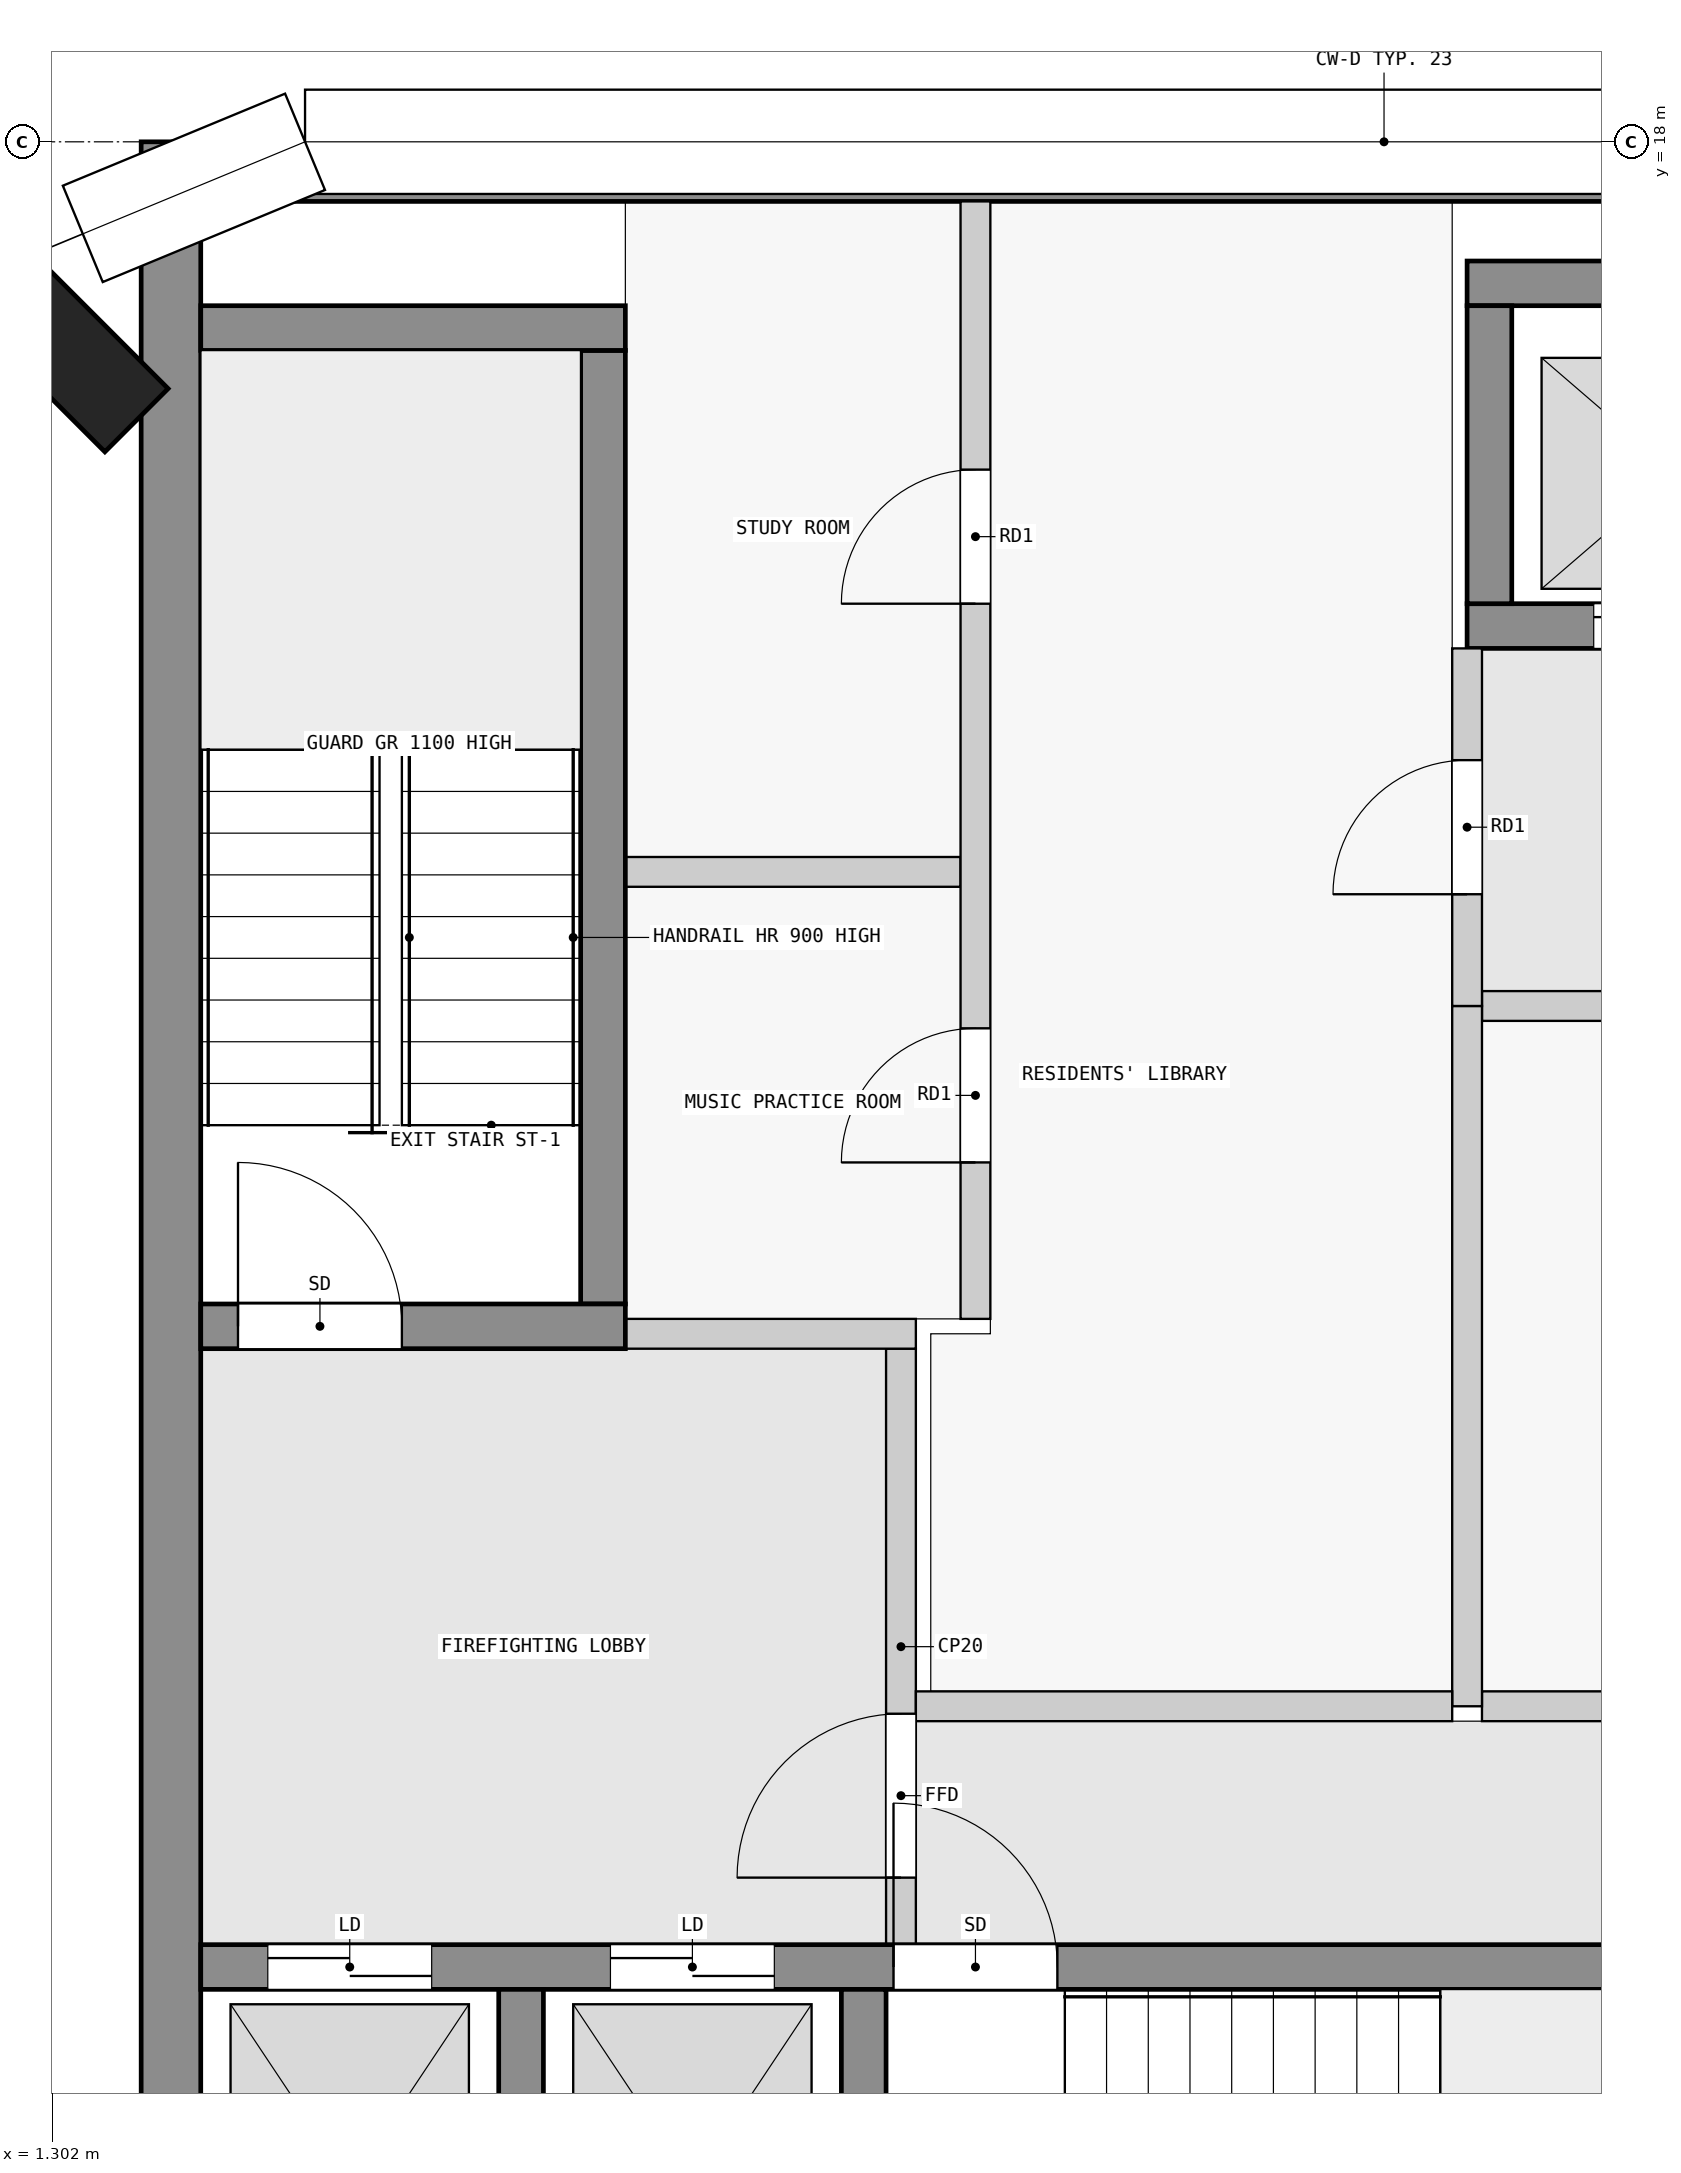
"""IFC4 building model, lengths in metres.
Left out: names, types, materials, properties, quantities, classifications, styles, units other than length and angle.
Written with IfcOpenShell. Run it as: python <this file> out.ifc"""

import sys

from ifc_helpers import new_model, si_unit, direction, frame, frame_2d, origin, origin_2d, place, context, subcontext, project, spatial, rectangle, extrude, element, fill, save


model = new_model("IFC4")
c1 = context("Model", 3, precision=1e-05, world=origin(), true_north=direction((0.0, 1.0)))
c2 = subcontext(c1, "Body", "Model", "MODEL_VIEW")
j1 = project(units=[si_unit("LENGTHUNIT", "METRE"), si_unit("PLANEANGLEUNIT", "RADIAN")], contexts=[c1])
p1 = place(None, origin())
s1 = spatial("IfcSite", under=j1, at=p1, CompositionType="ELEMENT")
p2 = place(p1, origin())
s2 = spatial("IfcBuilding", under=s1, at=p2, CompositionType="ELEMENT")
p3 = place(p2, frame((0.0, 0.0, 298.4)))
s3 = spatial("IfcBuildingStorey", under=s2, at=p3, CompositionType="ELEMENT", Elevation=298.4)
p4 = place(p3, frame((1.374, 16.626, 0.0), z_axis=(0.0, 0.0, 1.0), x_axis=(0.707106781187, 0.707106781187, 0.0)))
e1 = element("IfcColumn", 1, at=p4, inside=s3, PredefinedType="COLUMN", context=c2, shape_type="SweptSolid", body=[
    extrude(rectangle(XDim=0.6, YDim=1.4, at=origin_2d()), origin(), (0.0, 0.0, 1.0), 3.5),
])
p5 = place(p3, frame((1.9, 17.8, 0.0), z_axis=(0.0, 0.0, 1.0), x_axis=(1.0, 0.0, 0.0)))
e2 = element("IfcWall", 2, at=p5, inside=s3, PredefinedType="SHEAR", context=c2, shape_type="SweptSolid", body=[
    extrude(rectangle(XDim=20.6, YDim=0.4, at=frame_2d((10.3, 0.0))), origin(), (0.0, 0.0, 1.0), 3.05),
])
p6 = place(p3, frame((2.1, 2.5, 0.0), z_axis=(0.0, 0.0, 1.0), x_axis=(0.0, 1.0, 0.0)))
e3 = element("IfcWall", 3, at=p6, inside=s3, PredefinedType="SHEAR", context=c2, shape_type="SweptSolid", body=[
    extrude(rectangle(XDim=15.1, YDim=0.4, at=frame_2d((7.55, 0.0))), origin(), (0.0, 0.0, 1.0), 3.05),
])
for number, where, z_axis, x_axis in (
    (4, (4.45, 2.8, 0.0), (0.0, 0.0, 1.0), (0.0, 1.0, 0.0)),
    (5, (6.75, 2.8, 0.0), (0.0, 0.0, 1.0), (0.0, 1.0, 0.0)),
):
    element("IfcWall", number, at=place(p3, frame(where, z_axis=z_axis, x_axis=x_axis)), inside=s3, PredefinedType="SHEAR", context=c2, shape_type="SweptSolid", body=[
        extrude(rectangle(XDim=2.8, YDim=0.3, at=frame_2d((1.4, 0.0))), origin(), (0.0, 0.0, 1.0), 3.05),
    ])
p7 = place(p3, frame((2.3, 5.75, 0.0), z_axis=(0.0, 0.0, 1.0), x_axis=(1.0, 0.0, 0.0)))
e6 = element("IfcWall", 6, at=p7, inside=s3, PredefinedType="SHEAR", context=c2, shape_type="SweptSolid", body=[
    extrude(rectangle(XDim=18.8, YDim=0.3, at=frame_2d((9.4, 0.0))), origin(), (0.0, 0.0, 1.0), 3.05),
])
p8 = place(p7, frame((4.65, 0.0, 0.0)))
e7 = element("IfcOpeningElement", 7, at=p8, cuts=e6, PredefinedType="OPENING", context=c2, shape_type="SweptSolid", body=[
    extrude(rectangle(XDim=1.1, YDim=2.1, at=frame_2d((0.55, 1.05))), frame((0.0, 0.16, 0.0), z_axis=(0.0, -1.0, 0.0), x_axis=(1.0, 0.0, 0.0)), (0.0, 0.0, 1.0), 0.32),
])
p9 = place(p7, frame((0.45, 0.0, 0.0)))
e8 = element("IfcOpeningElement", 8, at=p9, cuts=e6, PredefinedType="OPENING", context=c2, shape_type="SweptSolid", body=[
    extrude(rectangle(XDim=1.1, YDim=2.1, at=frame_2d((0.55, 1.05))), frame((0.0, 0.16, 0.0), z_axis=(0.0, -1.0, 0.0), x_axis=(1.0, 0.0, 0.0)), (0.0, 0.0, 1.0), 0.32),
])
p10 = place(p7, frame((2.75, 0.0, 0.0)))
e9 = element("IfcOpeningElement", 9, at=p10, cuts=e6, PredefinedType="OPENING", context=c2, shape_type="SweptSolid", body=[
    extrude(rectangle(XDim=1.1, YDim=2.1, at=frame_2d((0.55, 1.05))), frame((0.0, 0.16, 0.0), z_axis=(0.0, -1.0, 0.0), x_axis=(1.0, 0.0, 0.0)), (0.0, 0.0, 1.0), 0.32),
])
p11 = place(p7, frame((11.95, 0.0, 0.0)))
e10 = element("IfcOpeningElement", 10, at=p11, cuts=e6, PredefinedType="OPENING", context=c2, shape_type="SweptSolid", body=[
    extrude(rectangle(XDim=0.9, YDim=2.1, at=frame_2d((0.45, 1.05))), frame((0.0, 0.16, 0.0), z_axis=(0.0, -1.0, 0.0), x_axis=(1.0, 0.0, 0.0)), (0.0, 0.0, 1.0), 0.32),
])
p12 = place(p7, frame((15.7, 0.0, 0.0)))
e11 = element("IfcOpeningElement", 11, at=p12, cuts=e6, PredefinedType="OPENING", context=c2, shape_type="SweptSolid", body=[
    extrude(rectangle(XDim=0.9, YDim=2.1, at=frame_2d((0.45, 1.05))), frame((0.0, 0.16, 0.0), z_axis=(0.0, -1.0, 0.0), x_axis=(1.0, 0.0, 0.0)), (0.0, 0.0, 1.0), 0.32),
])
p13 = place(p3, frame((2.3, 10.05, 0.0), z_axis=(0.0, 0.0, 1.0), x_axis=(1.0, 0.0, 0.0)))
e12 = element("IfcWall", 12, at=p13, inside=s3, PredefinedType="SHEAR", context=c2, shape_type="SweptSolid", body=[
    extrude(rectangle(XDim=2.85, YDim=0.3, at=frame_2d((1.425, 0.0))), origin(), (0.0, 0.0, 1.0), 3.05),
])
p14 = place(p13, frame((0.25, 0.0, 0.0)))
e13 = element("IfcOpeningElement", 13, at=p14, cuts=e12, PredefinedType="OPENING", context=c2, shape_type="SweptSolid", body=[
    extrude(rectangle(XDim=1.1, YDim=2.1, at=frame_2d((0.55, 1.05))), frame((0.0, 0.16, 0.0), z_axis=(0.0, -1.0, 0.0), x_axis=(1.0, 0.0, 0.0)), (0.0, 0.0, 1.0), 0.32),
])
p15 = place(p3, frame((5.0, 10.2, 0.0), z_axis=(0.0, 0.0, 1.0), x_axis=(0.0, 1.0, 0.0)))
e14 = element("IfcWall", 14, at=p15, inside=s3, PredefinedType="SHEAR", context=c2, shape_type="SweptSolid", body=[
    extrude(rectangle(XDim=6.4, YDim=0.3, at=frame_2d((3.2, 0.0))), origin(), (0.0, 0.0, 1.0), 3.05),
])
p16 = place(p3, frame((2.3, 16.75, 0.0), z_axis=(0.0, 0.0, 1.0), x_axis=(1.0, 0.0, 0.0)))
e15 = element("IfcWall", 15, at=p16, inside=s3, PredefinedType="SHEAR", context=c2, shape_type="SweptSolid", body=[
    extrude(rectangle(XDim=2.85, YDim=0.3, at=frame_2d((1.425, 0.0))), origin(), (0.0, 0.0, 1.0), 3.05),
])
p17 = place(p3, frame((10.8, 17.05, 0.0), z_axis=(0.0, 0.0, 1.0), x_axis=(1.0, 0.0, 0.0)))
e16 = element("IfcWall", 16, at=p17, inside=s3, PredefinedType="SHEAR", context=c2, shape_type="SweptSolid", body=[
    extrude(rectangle(XDim=7.8, YDim=0.3, at=frame_2d((3.9, 0.0))), origin(), (0.0, 0.0, 1.0), 3.05),
])
p18 = place(p3, frame((10.8, 14.75, 0.0), z_axis=(0.0, 0.0, 1.0), x_axis=(1.0, 0.0, 0.0)))
e17 = element("IfcWall", 17, at=p18, inside=s3, PredefinedType="SHEAR", context=c2, shape_type="SweptSolid", body=[
    extrude(rectangle(XDim=7.8, YDim=0.3, at=frame_2d((3.9, 0.0))), origin(), (0.0, 0.0, 1.0), 3.05),
])
p19 = place(p18, frame((0.85, 0.0, 0.0)))
e18 = element("IfcOpeningElement", 18, at=p19, cuts=e17, PredefinedType="OPENING", context=c2, shape_type="SweptSolid", body=[
    extrude(rectangle(XDim=1.1, YDim=2.1, at=frame_2d((0.55, 1.05))), frame((0.0, 0.16, 0.0), z_axis=(0.0, -1.0, 0.0), x_axis=(1.0, 0.0, 0.0)), (0.0, 0.0, 1.0), 0.32),
])
p20 = place(p18, frame((3.35, 0.0, 0.0)))
e19 = element("IfcOpeningElement", 19, at=p20, cuts=e17, PredefinedType="OPENING", context=c2, shape_type="SweptSolid", body=[
    extrude(rectangle(XDim=1.1, YDim=2.1, at=frame_2d((0.55, 1.05))), frame((0.0, 0.16, 0.0), z_axis=(0.0, -1.0, 0.0), x_axis=(1.0, 0.0, 0.0)), (0.0, 0.0, 1.0), 0.32),
])
p21 = place(p18, frame((5.85, 0.0, 0.0)))
e20 = element("IfcOpeningElement", 20, at=p21, cuts=e17, PredefinedType="OPENING", context=c2, shape_type="SweptSolid", body=[
    extrude(rectangle(XDim=1.1, YDim=2.1, at=frame_2d((0.55, 1.05))), frame((0.0, 0.16, 0.0), z_axis=(0.0, -1.0, 0.0), x_axis=(1.0, 0.0, 0.0)), (0.0, 0.0, 1.0), 0.32),
])
p22 = place(p3, frame((10.95, 14.9, 0.0), z_axis=(0.0, 0.0, 1.0), x_axis=(0.0, 1.0, 0.0)))
e21 = element("IfcWall", 21, at=p22, inside=s3, PredefinedType="SHEAR", context=c2, shape_type="SweptSolid", body=[
    extrude(rectangle(XDim=2.0, YDim=0.3, at=frame_2d((1.0, 0.0))), origin(), (0.0, 0.0, 1.0), 3.05),
])
p23 = place(p3, frame((7.0, 5.9, 0.0), z_axis=(0.0, 0.0, 1.0), x_axis=(0.0, 1.0, 0.0)))
e22 = element("IfcWall", 22, at=p23, inside=s3, PredefinedType="PARTITIONING", context=c2, shape_type="SweptSolid", body=[
    extrude(rectangle(XDim=4.0, YDim=0.2, at=frame_2d((2.0, 0.0))), origin(), (0.0, 0.0, 1.0), 3.05),
])
p24 = place(p23, frame((0.45, 0.0, 0.0)))
e23 = element("IfcOpeningElement", 23, at=p24, cuts=e22, PredefinedType="OPENING", context=c2, shape_type="SweptSolid", body=[
    extrude(rectangle(XDim=1.1, YDim=2.1, at=frame_2d((0.55, 1.05))), frame((0.0, 0.11, 0.0), z_axis=(0.0, -1.0, 0.0), x_axis=(1.0, 0.0, 0.0)), (0.0, 0.0, 1.0), 0.22),
])
p25 = place(p3, frame((5.15, 10.0, 0.0), z_axis=(0.0, 0.0, 1.0), x_axis=(1.0, 0.0, 0.0)))
e24 = element("IfcWall", 24, at=p25, inside=s3, PredefinedType="PARTITIONING", context=c2, shape_type="SweptSolid", body=[
    extrude(rectangle(XDim=1.95, YDim=0.2, at=frame_2d((0.975, 0.0))), origin(), (0.0, 0.0, 1.0), 3.05),
])
p26 = place(p3, frame((7.1, 7.5, 0.0), z_axis=(0.0, 0.0, 1.0), x_axis=(1.0, 0.0, 0.0)))
e25 = element("IfcWall", 25, at=p26, inside=s3, PredefinedType="PARTITIONING", context=c2, shape_type="SweptSolid", body=[
    extrude(rectangle(XDim=3.6, YDim=0.2, at=frame_2d((1.8, 0.0))), origin(), (0.0, 0.0, 1.0), 3.05),
])
p27 = place(p3, frame((10.8, 12.2, 0.0), z_axis=(0.0, 0.0, 1.0), x_axis=(0.0, 1.0, 0.0)))
e26 = element("IfcWall", 26, at=p27, inside=s3, PredefinedType="PARTITIONING", context=c2, shape_type="SweptSolid", body=[
    extrude(rectangle(XDim=2.4, YDim=0.2, at=frame_2d((1.2, 0.0))), origin(), (0.0, 0.0, 1.0), 3.05),
])
p28 = place(p27, frame((0.75, 0.0, 0.0)))
e27 = element("IfcOpeningElement", 27, at=p28, cuts=e26, PredefinedType="OPENING", context=c2, shape_type="SweptSolid", body=[
    extrude(rectangle(XDim=0.9, YDim=2.1, at=frame_2d((0.45, 1.05))), frame((0.0, 0.11, 0.0), z_axis=(0.0, -1.0, 0.0), x_axis=(1.0, 0.0, 0.0)), (0.0, 0.0, 1.0), 0.22),
])
p29 = place(p3, frame((10.8, 7.5, 0.0), z_axis=(0.0, 0.0, 1.0), x_axis=(0.0, 1.0, 0.0)))
e28 = element("IfcWall", 28, at=p29, inside=s3, PredefinedType="PARTITIONING", context=c2, shape_type="SweptSolid", body=[
    extrude(rectangle(XDim=4.7, YDim=0.2, at=frame_2d((2.35, 0.0))), origin(), (0.0, 0.0, 1.0), 3.05),
])
p30 = place(p3, frame((10.9, 7.5, 0.0), z_axis=(0.0, 0.0, 1.0), x_axis=(1.0, 0.0, 0.0)))
e29 = element("IfcWall", 29, at=p30, inside=s3, PredefinedType="PARTITIONING", context=c2, shape_type="SweptSolid", body=[
    extrude(rectangle(XDim=8.7, YDim=0.2, at=frame_2d((4.35, 0.0))), origin(), (0.0, 0.0, 1.0), 3.05),
])
p31 = place(p3, frame((10.9, 12.2, 0.0), z_axis=(0.0, 0.0, 1.0), x_axis=(1.0, 0.0, 0.0)))
e30 = element("IfcWall", 30, at=p31, inside=s3, PredefinedType="PARTITIONING", context=c2, shape_type="SweptSolid", body=[
    extrude(rectangle(XDim=8.7, YDim=0.2, at=frame_2d((4.35, 0.0))), origin(), (0.0, 0.0, 1.0), 3.05),
])
p32 = place(p31, frame((1.45, 0.0, 0.0)))
e31 = element("IfcOpeningElement", 31, at=p32, cuts=e30, PredefinedType="OPENING", context=c2, shape_type="SweptSolid", body=[
    extrude(rectangle(XDim=0.9, YDim=2.1, at=frame_2d((0.45, 1.05))), frame((0.0, 0.11, 0.0), z_axis=(0.0, -1.0, 0.0), x_axis=(1.0, 0.0, 0.0)), (0.0, 0.0, 1.0), 0.22),
])
p33 = place(p31, frame((5.9, 0.0, 0.0)))
e32 = element("IfcOpeningElement", 32, at=p33, cuts=e30, PredefinedType="OPENING", context=c2, shape_type="SweptSolid", body=[
    extrude(rectangle(XDim=0.9, YDim=2.1, at=frame_2d((0.45, 1.05))), frame((0.0, 0.11, 0.0), z_axis=(0.0, -1.0, 0.0), x_axis=(1.0, 0.0, 0.0)), (0.0, 0.0, 1.0), 0.22),
])
p34 = place(p3, frame((7.5, 10.1, 0.0), z_axis=(0.0, 0.0, 1.0), x_axis=(0.0, 1.0, 0.0)))
e33 = element("IfcWall", 33, at=p34, inside=s3, PredefinedType="PARTITIONING", context=c2, shape_type="SweptSolid", body=[
    extrude(rectangle(XDim=7.5, YDim=0.2, at=frame_2d((3.75, 0.0))), origin(), (0.0, 0.0, 1.0), 3.05),
])
p35 = place(p34, frame((1.05, 0.0, 0.0)))
e34 = element("IfcOpeningElement", 34, at=p35, cuts=e33, PredefinedType="OPENING", context=c2, shape_type="SweptSolid", body=[
    extrude(rectangle(XDim=0.9, YDim=2.1, at=frame_2d((0.45, 1.05))), frame((0.0, 0.11, 0.0), z_axis=(0.0, -1.0, 0.0), x_axis=(1.0, 0.0, 0.0)), (0.0, 0.0, 1.0), 0.22),
])
p36 = place(p34, frame((4.8, 0.0, 0.0)))
e35 = element("IfcOpeningElement", 35, at=p36, cuts=e33, PredefinedType="OPENING", context=c2, shape_type="SweptSolid", body=[
    extrude(rectangle(XDim=0.9, YDim=2.1, at=frame_2d((0.45, 1.05))), frame((0.0, 0.11, 0.0), z_axis=(0.0, -1.0, 0.0), x_axis=(1.0, 0.0, 0.0)), (0.0, 0.0, 1.0), 0.22),
])
p37 = place(p3, frame((5.15, 13.1, 0.0), z_axis=(0.0, 0.0, 1.0), x_axis=(1.0, 0.0, 0.0)))
e36 = element("IfcWall", 36, at=p37, inside=s3, PredefinedType="PARTITIONING", context=c2, shape_type="SweptSolid", body=[
    extrude(rectangle(XDim=2.25, YDim=0.2, at=frame_2d((1.125, 0.0))), origin(), (0.0, 0.0, 1.0), 3.05),
])
p38 = place(p24, origin())
e37 = element("IfcDoor", 37, at=p38, inside=s3, OperationType="SINGLE_SWING_LEFT", PredefinedType="DOOR", context=c2, shape_type="SweptSolid", body=[
    extrude(rectangle(XDim=1.1, YDim=2.1, at=frame_2d((0.55, 1.05))), frame((0.0, 0.025, 0.0), z_axis=(0.0, -1.0, 0.0), x_axis=(1.0, 0.0, 0.0)), (0.0, 0.0, 1.0), 0.05),
])
fill(e23, e37)
p39 = place(p14, origin())
e38 = element("IfcDoor", 38, at=p39, inside=s3, OperationType="SINGLE_SWING_RIGHT", PredefinedType="DOOR", context=c2, shape_type="SweptSolid", body=[
    extrude(rectangle(XDim=1.1, YDim=2.1, at=frame_2d((0.55, 1.05))), frame((0.0, 0.025, 0.0), z_axis=(0.0, -1.0, 0.0), x_axis=(1.0, 0.0, 0.0)), (0.0, 0.0, 1.0), 0.05),
])
fill(e13, e38)
p40 = place(p28, origin())
e39 = element("IfcDoor", 39, at=p40, inside=s3, OperationType="SINGLE_SWING_LEFT", PredefinedType="DOOR", context=c2, shape_type="SweptSolid", body=[
    extrude(rectangle(XDim=0.9, YDim=2.1, at=frame_2d((0.45, 1.05))), frame((0.0, 0.025, 0.0), z_axis=(0.0, -1.0, 0.0), x_axis=(1.0, 0.0, 0.0)), (0.0, 0.0, 1.0), 0.05),
])
fill(e27, e39)
p41 = place(p8, origin())
e40 = element("IfcDoor", 40, at=p41, inside=s3, OperationType="SINGLE_SWING_LEFT", PredefinedType="DOOR", context=c2, shape_type="SweptSolid", body=[
    extrude(rectangle(XDim=1.1, YDim=2.1, at=frame_2d((0.55, 1.05))), frame((0.0, 0.025, 0.0), z_axis=(0.0, -1.0, 0.0), x_axis=(1.0, 0.0, 0.0)), (0.0, 0.0, 1.0), 0.05),
])
fill(e7, e40)
p42 = place(p9, origin())
e41 = element("IfcDoor", 41, at=p42, inside=s3, OperationType="DOUBLE_DOOR_SLIDING", PredefinedType="DOOR", context=c2, shape_type="SweptSolid", body=[
    extrude(rectangle(XDim=1.1, YDim=2.1, at=frame_2d((0.55, 1.05))), frame((0.0, 0.025, 0.0), z_axis=(0.0, -1.0, 0.0), x_axis=(1.0, 0.0, 0.0)), (0.0, 0.0, 1.0), 0.05),
])
fill(e8, e41)
p43 = place(p10, origin())
e42 = element("IfcDoor", 42, at=p43, inside=s3, OperationType="DOUBLE_DOOR_SLIDING", PredefinedType="DOOR", context=c2, shape_type="SweptSolid", body=[
    extrude(rectangle(XDim=1.1, YDim=2.1, at=frame_2d((0.55, 1.05))), frame((0.0, 0.025, 0.0), z_axis=(0.0, -1.0, 0.0), x_axis=(1.0, 0.0, 0.0)), (0.0, 0.0, 1.0), 0.05),
])
fill(e9, e42)
p44 = place(p19, origin())
e43 = element("IfcDoor", 43, at=p44, inside=s3, OperationType="DOUBLE_DOOR_SLIDING", PredefinedType="DOOR", context=c2, shape_type="SweptSolid", body=[
    extrude(rectangle(XDim=1.1, YDim=2.1, at=frame_2d((0.55, 1.05))), frame((0.0, 0.025, 0.0), z_axis=(0.0, -1.0, 0.0), x_axis=(1.0, 0.0, 0.0)), (0.0, 0.0, 1.0), 0.05),
])
fill(e18, e43)
p45 = place(p35, origin())
e44 = element("IfcDoor", 44, at=p45, inside=s3, OperationType="SINGLE_SWING_RIGHT", PredefinedType="DOOR", context=c2, shape_type="SweptSolid", body=[
    extrude(rectangle(XDim=0.9, YDim=2.1, at=frame_2d((0.45, 1.05))), frame((0.0, 0.025, 0.0), z_axis=(0.0, -1.0, 0.0), x_axis=(1.0, 0.0, 0.0)), (0.0, 0.0, 1.0), 0.05),
])
fill(e34, e44)
p46 = place(p36, origin())
e45 = element("IfcDoor", 45, at=p46, inside=s3, OperationType="SINGLE_SWING_RIGHT", PredefinedType="DOOR", context=c2, shape_type="SweptSolid", body=[
    extrude(rectangle(XDim=0.9, YDim=2.1, at=frame_2d((0.45, 1.05))), frame((0.0, 0.025, 0.0), z_axis=(0.0, -1.0, 0.0), x_axis=(1.0, 0.0, 0.0)), (0.0, 0.0, 1.0), 0.05),
])
fill(e35, e45)
save(model, sys.argv[1])
